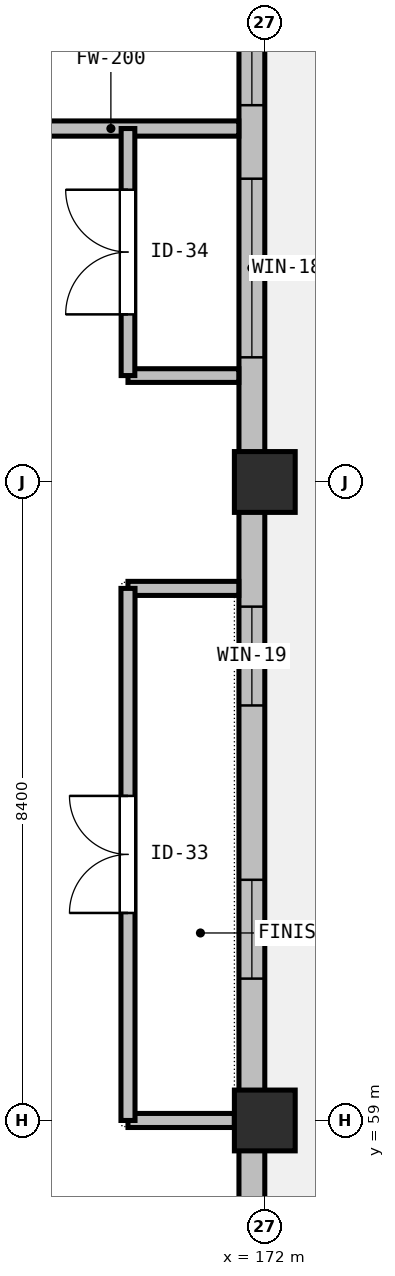
"""IFC4 building model, lengths in metres.
Left out: names, types, materials, properties, quantities, classifications, styles, units other than length and angle.
Written with IfcOpenShell. Run it as: python <this file> out.ifc"""

import sys

from ifc_helpers import new_model, si_unit, direction, frame, frame_2d, origin, origin_2d, place, context, subcontext, project, spatial, rectangle, extrude, element, fill, save


model = new_model("IFC4")
c1 = context("Model", 3, precision=1e-05, world=origin(), true_north=direction((0.0, 1.0)))
c2 = subcontext(c1, "Body", "Model", "MODEL_VIEW")
j1 = project(units=[si_unit("LENGTHUNIT", "METRE"), si_unit("PLANEANGLEUNIT", "RADIAN")], contexts=[c1])
p1 = place(None, origin())
s1 = spatial("IfcSite", under=j1, at=p1, CompositionType="ELEMENT")
p2 = place(p1, origin())
s2 = spatial("IfcBuilding", under=s1, at=p2, CompositionType="ELEMENT")
p3 = place(p2, origin())
s3 = spatial("IfcBuildingStorey", under=s2, at=p3, CompositionType="ELEMENT", Elevation=0.0)
for number, where, z_axis, x_axis in (
    (1, (172.0, 59.0, 0.0), (0.0, 0.0, 1.0), (1.0, 0.0, 0.0)),
    (2, (172.0, 67.4, 0.0), (0.0, 0.0, 1.0), (1.0, 0.0, 0.0)),
):
    element("IfcColumn", number, at=place(p3, frame(where, z_axis=z_axis, x_axis=x_axis)), inside=s3, PredefinedType="COLUMN", context=c2, shape_type="SweptSolid", body=[
        extrude(rectangle(XDim=0.8, YDim=0.8, at=origin_2d()), origin(), (0.0, 0.0, 1.0), 5.4),
    ])
p4 = place(p3, frame((171.83, 75.8, 0.0), z_axis=(0.0, 0.0, 1.0), x_axis=(0.0, -1.0, 0.0)))
e3 = element("IfcWall", 3, at=p4, inside=s3, PredefinedType="STANDARD", context=c2, shape_type="SweptSolid", body=[
    extrude(rectangle(XDim=8.4, YDim=0.34, at=frame_2d((4.2, 0.0))), origin(), (0.0, 0.0, 1.0), 4.685),
])
p5 = place(p4, frame((1.093, 0.0, 0.9)))
e4 = element("IfcOpeningElement", 4, at=p5, cuts=e3, PredefinedType="OPENING", context=c2, shape_type="SweptSolid", body=[
    extrude(rectangle(XDim=2.35, YDim=1.5, at=frame_2d((1.175, 0.75))), frame((0.0, 0.18, 0.0), z_axis=(0.0, -1.0, 0.0), x_axis=(1.0, 0.0, 0.0)), (0.0, 0.0, 1.0), 0.36),
])
p6 = place(p4, frame((4.41, 0.0, 0.9)))
e5 = element("IfcOpeningElement", 5, at=p6, cuts=e3, PredefinedType="OPENING", context=c2, shape_type="SweptSolid", body=[
    extrude(rectangle(XDim=2.35, YDim=1.5, at=frame_2d((1.175, 0.75))), frame((0.0, 0.18, 0.0), z_axis=(0.0, -1.0, 0.0), x_axis=(1.0, 0.0, 0.0)), (0.0, 0.0, 1.0), 0.36),
])
p7 = place(p3, frame((171.83, 67.4, 0.0), z_axis=(0.0, 0.0, 1.0), x_axis=(0.0, -1.0, 0.0)))
e6 = element("IfcWall", 6, at=p7, inside=s3, PredefinedType="STANDARD", context=c2, shape_type="SweptSolid", body=[
    extrude(rectangle(XDim=8.06, YDim=0.34, at=frame_2d((4.03, 0.0))), origin(), (0.0, 0.0, 1.0), 4.685),
])
p8 = place(p7, frame((1.64, 0.0, 0.75)))
e7 = element("IfcOpeningElement", 7, at=p8, cuts=e6, PredefinedType="OPENING", context=c2, shape_type="SweptSolid", body=[
    extrude(rectangle(XDim=1.3, YDim=2.4, at=frame_2d((0.65, 1.2))), frame((0.0, 0.18, 0.0), z_axis=(0.0, -1.0, 0.0), x_axis=(1.0, 0.0, 0.0)), (0.0, 0.0, 1.0), 0.36),
])
p9 = place(p7, frame((5.234, 0.0, 0.75)))
e8 = element("IfcOpeningElement", 8, at=p9, cuts=e6, PredefinedType="OPENING", context=c2, shape_type="SweptSolid", body=[
    extrude(rectangle(XDim=1.3, YDim=2.4, at=frame_2d((0.65, 1.2))), frame((0.0, 0.18, 0.0), z_axis=(0.0, -1.0, 0.0), x_axis=(1.0, 0.0, 0.0)), (0.0, 0.0, 1.0), 0.36),
])
p10 = place(p3, frame((171.83, 58.66, 0.0), z_axis=(0.0, 0.0, 1.0), x_axis=(0.0, -1.0, 0.0)))
e9 = element("IfcWall", 9, at=p10, inside=s3, PredefinedType="STANDARD", context=c2, shape_type="SweptSolid", body=[
    extrude(rectangle(XDim=8.06, YDim=0.34, at=frame_2d((4.03, 0.0))), origin(), (0.0, 0.0, 1.0), 4.685),
])
p11 = place(p10, frame((3.1, 0.0, 0.75)))
e10 = element("IfcOpeningElement", 10, at=p11, cuts=e9, PredefinedType="OPENING", context=c2, shape_type="SweptSolid", body=[
    extrude(rectangle(XDim=1.55, YDim=2.4, at=frame_2d((0.775, 1.2))), frame((0.0, 0.18, 0.0), z_axis=(0.0, -1.0, 0.0), x_axis=(1.0, 0.0, 0.0)), (0.0, 0.0, 1.0), 0.36),
])
p12 = place(p10, frame((5.109, 0.0, 0.75)))
e11 = element("IfcOpeningElement", 11, at=p12, cuts=e9, PredefinedType="OPENING", context=c2, shape_type="SweptSolid", body=[
    extrude(rectangle(XDim=1.55, YDim=2.4, at=frame_2d((0.775, 1.2))), frame((0.0, 0.18, 0.0), z_axis=(0.0, -1.0, 0.0), x_axis=(1.0, 0.0, 0.0)), (0.0, 0.0, 1.0), 0.36),
])
p13 = place(p3, frame((171.658, 72.05, 0.0), z_axis=(0.0, 0.0, 1.0), x_axis=(-1.0, 0.0, 0.0)))
e12 = element("IfcWall", 12, at=p13, inside=s3, PredefinedType="PARTITIONING", context=c2, shape_type="SweptSolid", body=[
    extrude(rectangle(XDim=3.108, YDim=0.2, at=frame_2d((1.554, 0.0))), origin(), (0.0, 0.0, 1.0), 4.685),
])
p14 = place(p3, frame((170.2, 66.0, 0.0), z_axis=(0.0, 0.0, 1.0), x_axis=(1.0, 0.0, 0.0)))
e13 = element("IfcWall", 13, at=p14, inside=s3, PredefinedType="PARTITIONING", context=c2, shape_type="SweptSolid", body=[
    extrude(rectangle(XDim=1.458, YDim=0.185, at=frame_2d((0.729, 0.0))), origin(), (0.0, 0.0, 1.0), 4.685),
])
p15 = place(p3, frame((171.6, 59.0, 0.0), z_axis=(0.0, 0.0, 1.0), x_axis=(-1.0, 0.0, 0.0)))
e14 = element("IfcWall", 14, at=p15, inside=s3, PredefinedType="PARTITIONING", context=c2, shape_type="SweptSolid", body=[
    extrude(rectangle(XDim=1.4, YDim=0.185, at=frame_2d((0.7, 0.0))), origin(), (0.0, 0.0, 1.0), 4.735),
])
p16 = place(p3, frame((170.2, 59.0, 0.0), z_axis=(0.0, 0.0, 1.0), x_axis=(0.0, 1.0, 0.0)))
e15 = element("IfcWall", 15, at=p16, inside=s3, PredefinedType="PARTITIONING", context=c2, shape_type="SweptSolid", body=[
    extrude(rectangle(XDim=7.0, YDim=0.185, at=frame_2d((3.5, 0.0))), origin(), (0.0, 0.0, 1.0), 4.735),
])
p17 = place(p16, frame((2.73, 0.0, 0.0)))
e16 = element("IfcOpeningElement", 16, at=p17, cuts=e15, PredefinedType="OPENING", context=c2, shape_type="SweptSolid", body=[
    extrude(rectangle(XDim=1.54, YDim=2.2, at=frame_2d((0.77, 1.1))), frame((0.0, 0.103, 0.0), z_axis=(0.0, -1.0, 0.0), x_axis=(1.0, 0.0, 0.0)), (0.0, 0.0, 1.0), 0.205),
])
p18 = place(p3, frame((171.658, 68.8, 0.0), z_axis=(0.0, 0.0, 1.0), x_axis=(-1.0, 0.0, 0.0)))
e17 = element("IfcWall", 17, at=p18, inside=s3, PredefinedType="PARTITIONING", context=c2, shape_type="SweptSolid", body=[
    extrude(rectangle(XDim=1.458, YDim=0.18, at=frame_2d((0.729, 0.0))), origin(), (0.0, 0.0, 1.0), 4.685),
])
p19 = place(p3, frame((170.2, 68.8, 0.0), z_axis=(0.0, 0.0, 1.0), x_axis=(0.0, 1.0, 0.0)))
e18 = element("IfcWall", 18, at=p19, inside=s3, PredefinedType="PARTITIONING", context=c2, shape_type="SweptSolid", body=[
    extrude(rectangle(XDim=3.25, YDim=0.18, at=frame_2d((1.625, 0.0))), origin(), (0.0, 0.0, 1.0), 5.095),
])
p20 = place(p19, frame((0.805, 0.0, 0.0)))
e19 = element("IfcOpeningElement", 19, at=p20, cuts=e18, PredefinedType="OPENING", context=c2, shape_type="SweptSolid", body=[
    extrude(rectangle(XDim=1.64, YDim=2.2, at=frame_2d((0.82, 1.1))), frame((0.0, 0.1, 0.0), z_axis=(0.0, -1.0, 0.0), x_axis=(1.0, 0.0, 0.0)), (0.0, 0.0, 1.0), 0.2),
])
p21 = place(p5, origin())
e20 = element("IfcWindow", 20, at=p21, inside=s3, PartitioningType="SINGLE_PANEL", PredefinedType="WINDOW", context=c2, shape_type="SweptSolid", body=[
    extrude(rectangle(XDim=2.35, YDim=1.5, at=frame_2d((1.175, 0.75))), frame((0.0, 0.03, 0.0), z_axis=(0.0, -1.0, 0.0), x_axis=(1.0, 0.0, 0.0)), (0.0, 0.0, 1.0), 0.06),
])
fill(e4, e20)
p22 = place(p6, origin())
e21 = element("IfcWindow", 21, at=p22, inside=s3, PartitioningType="SINGLE_PANEL", PredefinedType="WINDOW", context=c2, shape_type="SweptSolid", body=[
    extrude(rectangle(XDim=2.35, YDim=1.5, at=frame_2d((1.175, 0.75))), frame((0.0, 0.03, 0.0), z_axis=(0.0, -1.0, 0.0), x_axis=(1.0, 0.0, 0.0)), (0.0, 0.0, 1.0), 0.06),
])
fill(e5, e21)
p23 = place(p8, origin())
e22 = element("IfcWindow", 22, at=p23, inside=s3, PartitioningType="SINGLE_PANEL", PredefinedType="WINDOW", context=c2, shape_type="SweptSolid", body=[
    extrude(rectangle(XDim=1.3, YDim=2.4, at=frame_2d((0.65, 1.2))), frame((0.0, 0.03, 0.0), z_axis=(0.0, -1.0, 0.0), x_axis=(1.0, 0.0, 0.0)), (0.0, 0.0, 1.0), 0.06),
])
fill(e7, e22)
p24 = place(p9, origin())
e23 = element("IfcWindow", 23, at=p24, inside=s3, PartitioningType="SINGLE_PANEL", PredefinedType="WINDOW", context=c2, shape_type="SweptSolid", body=[
    extrude(rectangle(XDim=1.3, YDim=2.4, at=frame_2d((0.65, 1.2))), frame((0.0, 0.03, 0.0), z_axis=(0.0, -1.0, 0.0), x_axis=(1.0, 0.0, 0.0)), (0.0, 0.0, 1.0), 0.06),
])
fill(e8, e23)
p25 = place(p17, origin())
e24 = element("IfcDoor", 24, at=p25, inside=s3, OperationType="DOUBLE_DOOR_SINGLE_SWING", PredefinedType="DOOR", context=c2, shape_type="SweptSolid", body=[
    extrude(rectangle(XDim=1.54, YDim=2.2, at=frame_2d((0.77, 1.1))), frame((0.0, 0.025, 0.0), z_axis=(0.0, -1.0, 0.0), x_axis=(1.0, 0.0, 0.0)), (0.0, 0.0, 1.0), 0.05),
])
fill(e16, e24)
p26 = place(p20, origin())
e25 = element("IfcDoor", 25, at=p26, inside=s3, OperationType="DOUBLE_DOOR_SINGLE_SWING", PredefinedType="DOOR", context=c2, shape_type="SweptSolid", body=[
    extrude(rectangle(XDim=1.64, YDim=2.2, at=frame_2d((0.82, 1.1))), frame((0.0, 0.025, 0.0), z_axis=(0.0, -1.0, 0.0), x_axis=(1.0, 0.0, 0.0)), (0.0, 0.0, 1.0), 0.05),
])
fill(e19, e25)
save(model, sys.argv[1])
